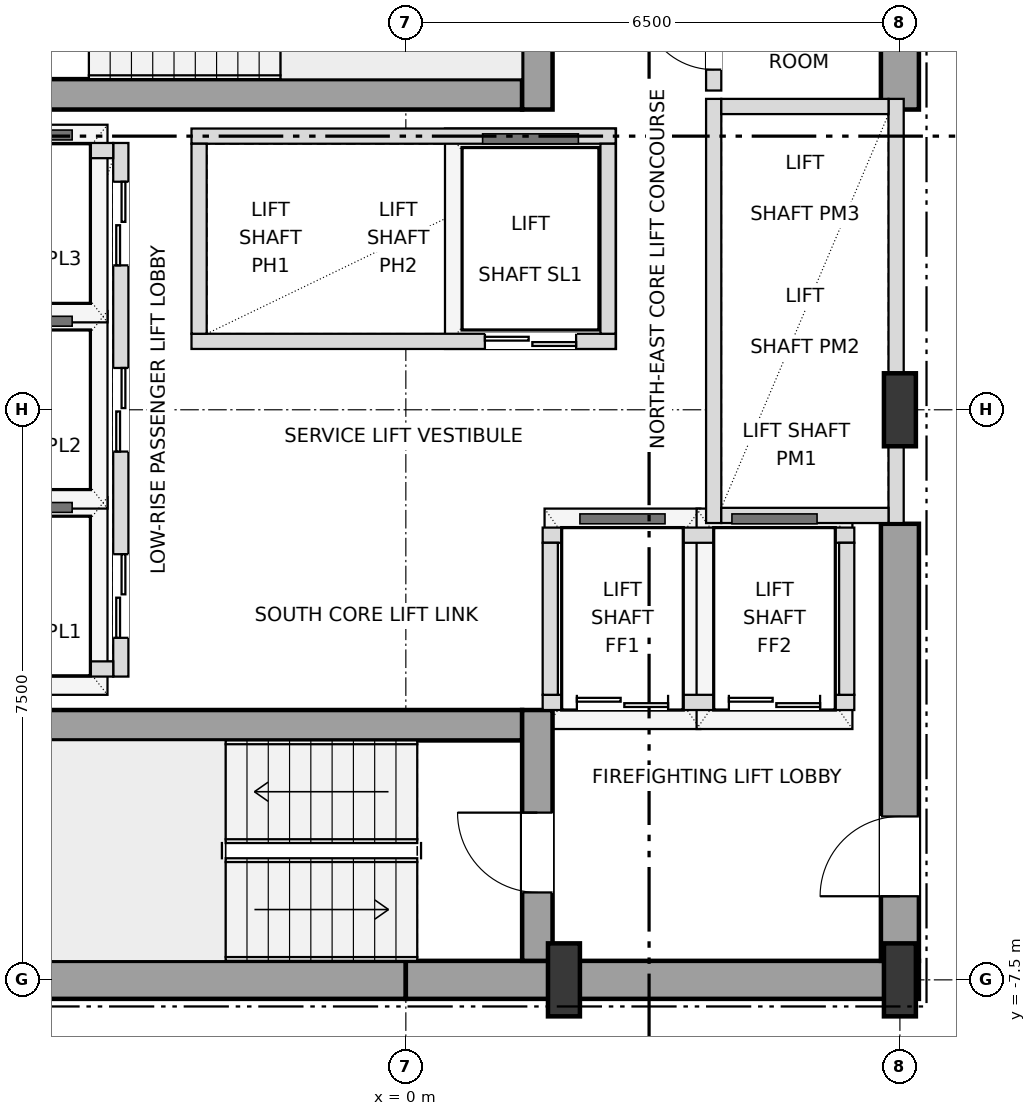
"""IFC4 building model, lengths in metres.
Left out: names, types, materials, properties, quantities, classifications, styles, units other than length and angle.
Written with IfcOpenShell. Run it as: python <this file> out.ifc"""

import sys

from ifc_helpers import new_model, si_unit, direction, frame, frame_2d, origin, origin_2d, place, context, subcontext, project, spatial, rectangle, i_section, extrude, element, fill, save


model = new_model("IFC4")
c1 = context("Model", 3, precision=1e-05, world=origin(), true_north=direction((0.0, 1.0)))
c2 = subcontext(c1, "Body", "Model", "MODEL_VIEW")
j1 = project(units=[si_unit("LENGTHUNIT", "METRE"), si_unit("PLANEANGLEUNIT", "RADIAN")], contexts=[c1])
p1 = place(None, origin())
s1 = spatial("IfcSite", under=j1, at=p1, CompositionType="ELEMENT")
p2 = place(p1, origin())
s2 = spatial("IfcBuilding", under=s1, at=p2, CompositionType="ELEMENT")
p3 = place(p2, frame((0.0, 0.0, 39.6)))
s3 = spatial("IfcBuildingStorey", under=s2, at=p3, CompositionType="ELEMENT", Elevation=39.6)
for number, where, z_axis, x_axis in (
    (1, (2.08, -7.5, 0.0), (0.0, 0.0, 1.0), (1.0, 0.0, 0.0)),
    (2, (6.5, -7.5, 0.0), (0.0, 0.0, 1.0), (1.0, 0.0, 0.0)),
    (3, (6.5, 0.0, 0.0), (0.0, 0.0, 1.0), (1.0, 0.0, 0.0)),
):
    element("IfcColumn", number, at=place(p3, frame(where, z_axis=z_axis, x_axis=x_axis)), inside=s3, PredefinedType="COLUMN", context=c2, shape_type="SweptSolid", body=[
        extrude(i_section(OverallWidth=0.42, OverallDepth=0.96, WebThickness=0.022, FlangeThickness=0.034, at=origin_2d()), origin(), (0.0, 0.0, 1.0), 3.6),
    ])
for number, where, z_axis, x_axis in (
    (4, (-6.75, -7.5, 0.0), (0.0, 0.0, 1.0), (1.0, 0.0, 0.0)),
    (5, (0.0, -7.5, 0.0), (0.0, 0.0, 1.0), (1.0, 0.0, 0.0)),
):
    element("IfcWall", number, at=place(p3, frame(where, z_axis=z_axis, x_axis=x_axis)), inside=s3, PredefinedType="SHEAR", context=c2, shape_type="SweptSolid", body=[
        extrude(rectangle(XDim=6.75, YDim=0.5, at=frame_2d((3.375, 0.0))), origin(), (0.0, 0.0, 1.0), 3.38),
    ])
p4 = place(p3, frame((6.5, -7.25, 0.0), z_axis=(0.0, 0.0, 1.0), x_axis=(0.0, 1.0, 0.0)))
e6 = element("IfcWall", 6, at=p4, inside=s3, PredefinedType="SHEAR", context=c2, shape_type="SweptSolid", body=[
    extrude(rectangle(XDim=5.75, YDim=0.5, at=frame_2d((2.875, 0.0))), origin(), (0.0, 0.0, 1.0), 3.38),
])
p5 = place(p4, frame((0.85, 0.0, 0.0)))
e7 = element("IfcOpeningElement", 7, at=p5, cuts=e6, PredefinedType="OPENING", context=c2, shape_type="SweptSolid", body=[
    extrude(rectangle(XDim=1.05, YDim=2.15, at=frame_2d((0.525, 1.075))), frame((0.0, 0.26, 0.0), z_axis=(0.0, -1.0, 0.0), x_axis=(1.0, 0.0, 0.0)), (0.0, 0.0, 1.0), 0.52),
])
p6 = place(p3, frame((6.5, 3.95, 0.0), z_axis=(0.0, 0.0, 1.0), x_axis=(0.0, 1.0, 0.0)))
e8 = element("IfcWall", 8, at=p6, inside=s3, PredefinedType="SHEAR", context=c2, shape_type="SweptSolid", body=[
    extrude(rectangle(XDim=3.3, YDim=0.5, at=frame_2d((1.65, 0.0))), origin(), (0.0, 0.0, 1.0), 3.38),
])
p7 = place(p3, frame((-6.25, -4.15, 0.0), z_axis=(0.0, 0.0, 1.0), x_axis=(1.0, 0.0, 0.0)))
e9 = element("IfcWall", 9, at=p7, inside=s3, PredefinedType="SHEAR", context=c2, shape_type="SweptSolid", body=[
    extrude(rectangle(XDim=7.78, YDim=0.4, at=frame_2d((3.89, 0.0))), origin(), (0.0, 0.0, 1.0), 3.38),
])
p8 = place(p3, frame((1.73, -7.25, 0.0), z_axis=(0.0, 0.0, 1.0), x_axis=(0.0, 1.0, 0.0)))
e10 = element("IfcWall", 10, at=p8, inside=s3, PredefinedType="SHEAR", context=c2, shape_type="SweptSolid", body=[
    extrude(rectangle(XDim=3.3, YDim=0.4, at=frame_2d((1.65, 0.0))), origin(), (0.0, 0.0, 1.0), 3.38),
])
p9 = place(p8, frame((0.9, 0.0, 0.0)))
e11 = element("IfcOpeningElement", 11, at=p9, cuts=e10, PredefinedType="OPENING", context=c2, shape_type="SweptSolid", body=[
    extrude(rectangle(XDim=1.05, YDim=2.15, at=frame_2d((0.525, 1.075))), frame((0.0, 0.21, 0.0), z_axis=(0.0, -1.0, 0.0), x_axis=(1.0, 0.0, 0.0)), (0.0, 0.0, 1.0), 0.42),
])
p10 = place(p3, frame((-5.55, 4.15, 0.0), z_axis=(0.0, 0.0, 1.0), x_axis=(1.0, 0.0, 0.0)))
e12 = element("IfcWall", 12, at=p10, inside=s3, PredefinedType="SHEAR", context=c2, shape_type="SweptSolid", body=[
    extrude(rectangle(XDim=7.08, YDim=0.4, at=frame_2d((3.54, 0.0))), origin(), (0.0, 0.0, 1.0), 3.38),
])
p11 = place(p3, frame((1.73, 3.95, 0.0), z_axis=(0.0, 0.0, 1.0), x_axis=(0.0, 1.0, 0.0)))
e13 = element("IfcWall", 13, at=p11, inside=s3, PredefinedType="SHEAR", context=c2, shape_type="SweptSolid", body=[
    extrude(rectangle(XDim=3.3, YDim=0.4, at=frame_2d((1.65, 0.0))), origin(), (0.0, 0.0, 1.0), 3.38),
])
p12 = place(p3, frame((-3.75, -3.51, 0.0), z_axis=(0.0, 0.0, 1.0), x_axis=(0.0, 1.0, 0.0)))
e14 = element("IfcWall", 14, at=p12, inside=s3, PredefinedType="SOLIDWALL", context=c2, shape_type="SweptSolid", body=[
    extrude(rectangle(XDim=7.02, YDim=0.2, at=frame_2d((3.51, 0.0))), origin(), (0.0, 0.0, 1.0), 3.38),
])
p13 = place(p12, frame((0.51, 0.0, 0.0)))
e15 = element("IfcOpeningElement", 15, at=p13, cuts=e14, PredefinedType="OPENING", context=c2, shape_type="SweptSolid", body=[
    extrude(rectangle(XDim=1.1, YDim=2.15, at=frame_2d((0.55, 1.075))), frame((0.0, 0.11, 0.0), z_axis=(0.0, -1.0, 0.0), x_axis=(1.0, 0.0, 0.0)), (0.0, 0.0, 1.0), 0.22),
])
p14 = place(p12, frame((2.96, 0.0, 0.0)))
e16 = element("IfcOpeningElement", 16, at=p14, cuts=e14, PredefinedType="OPENING", context=c2, shape_type="SweptSolid", body=[
    extrude(rectangle(XDim=1.1, YDim=2.15, at=frame_2d((0.55, 1.075))), frame((0.0, 0.11, 0.0), z_axis=(0.0, -1.0, 0.0), x_axis=(1.0, 0.0, 0.0)), (0.0, 0.0, 1.0), 0.22),
])
p15 = place(p12, frame((5.41, 0.0, 0.0)))
e17 = element("IfcOpeningElement", 17, at=p15, cuts=e14, PredefinedType="OPENING", context=c2, shape_type="SweptSolid", body=[
    extrude(rectangle(XDim=1.1, YDim=2.15, at=frame_2d((0.55, 1.075))), frame((0.0, 0.11, 0.0), z_axis=(0.0, -1.0, 0.0), x_axis=(1.0, 0.0, 0.0)), (0.0, 0.0, 1.0), 0.22),
])
for number, where, z_axis, x_axis in (
    (18, (-6.05, -3.41, 0.0), (0.0, 0.0, 1.0), (1.0, 0.0, 0.0)),
    (19, (-6.05, 3.41, 0.0), (0.0, 0.0, 1.0), (1.0, 0.0, 0.0)),
):
    element("IfcWall", number, at=place(p3, frame(where, z_axis=z_axis, x_axis=x_axis)), inside=s3, PredefinedType="SOLIDWALL", context=c2, shape_type="SweptSolid", body=[
        extrude(rectangle(XDim=2.2, YDim=0.2, at=frame_2d((1.1, 0.0))), origin(), (0.0, 0.0, 1.0), 3.38),
    ])
p16 = place(p3, frame((4.05, -1.49, 0.0), z_axis=(0.0, 0.0, 1.0), x_axis=(0.0, 1.0, 0.0)))
e20 = element("IfcWall", 20, at=p16, inside=s3, PredefinedType="SOLIDWALL", context=c2, shape_type="SweptSolid", body=[
    extrude(rectangle(XDim=5.58, YDim=0.2, at=frame_2d((2.79, 0.0))), origin(), (0.0, 0.0, 1.0), 3.38),
])
p17 = place(p3, frame((6.45, -1.49, 0.0), z_axis=(0.0, 0.0, 1.0), x_axis=(0.0, 1.0, 0.0)))
e21 = element("IfcWall", 21, at=p17, inside=s3, PredefinedType="SOLIDWALL", context=c2, shape_type="SweptSolid", body=[
    extrude(rectangle(XDim=5.58, YDim=0.2, at=frame_2d((2.79, 0.0))), origin(), (0.0, 0.0, 1.0), 2.816),
])
for number, where, z_axis, x_axis in (
    (22, (4.15, -1.39, 0.0), (0.0, 0.0, 1.0), (1.0, 0.0, 0.0)),
    (23, (4.15, 3.99, 0.0), (0.0, 0.0, 1.0), (1.0, 0.0, 0.0)),
):
    element("IfcWall", number, at=place(p3, frame(where, z_axis=z_axis, x_axis=x_axis)), inside=s3, PredefinedType="SOLIDWALL", context=c2, shape_type="SweptSolid", body=[
        extrude(rectangle(XDim=2.2, YDim=0.2, at=frame_2d((1.1, 0.0))), origin(), (0.0, 0.0, 1.0), 3.38),
    ])
p18 = place(p3, frame((-2.82, 0.9, 0.0), z_axis=(0.0, 0.0, 1.0), x_axis=(1.0, 0.0, 0.0)))
e24 = element("IfcWall", 24, at=p18, inside=s3, PredefinedType="SOLIDWALL", context=c2, shape_type="SweptSolid", body=[
    extrude(rectangle(XDim=5.58, YDim=0.2, at=frame_2d((2.79, 0.0))), origin(), (0.0, 0.0, 1.0), 3.38),
])
p19 = place(p18, frame((3.86, 0.0, 0.0)))
e25 = element("IfcOpeningElement", 25, at=p19, cuts=e24, PredefinedType="OPENING", context=c2, shape_type="SweptSolid", body=[
    extrude(rectangle(XDim=1.2, YDim=2.2, at=frame_2d((0.6, 1.1))), frame((0.0, 0.11, 0.0), z_axis=(0.0, -1.0, 0.0), x_axis=(1.0, 0.0, 0.0)), (0.0, 0.0, 1.0), 0.22),
])
p20 = place(p3, frame((-2.82, 3.6, 0.0), z_axis=(0.0, 0.0, 1.0), x_axis=(1.0, 0.0, 0.0)))
e26 = element("IfcWall", 26, at=p20, inside=s3, PredefinedType="SOLIDWALL", context=c2, shape_type="SweptSolid", body=[
    extrude(rectangle(XDim=5.58, YDim=0.2, at=frame_2d((2.79, 0.0))), origin(), (0.0, 0.0, 1.0), 3.38),
])
for number, where, z_axis, x_axis in (
    (27, (-2.72, 1.0, 0.0), (0.0, 0.0, 1.0), (0.0, 1.0, 0.0)),
    (28, (2.66, 1.0, 0.0), (0.0, 0.0, 1.0), (0.0, 1.0, 0.0)),
):
    element("IfcWall", number, at=place(p3, frame(where, z_axis=z_axis, x_axis=x_axis)), inside=s3, PredefinedType="SOLIDWALL", context=c2, shape_type="SweptSolid", body=[
        extrude(rectangle(XDim=2.5, YDim=0.2, at=frame_2d((1.25, 0.0))), origin(), (0.0, 0.0, 1.0), 3.38),
    ])
p21 = place(p3, frame((1.8, -3.85, 0.0), z_axis=(0.0, 0.0, 1.0), x_axis=(1.0, 0.0, 0.0)))
e29 = element("IfcWall", 29, at=p21, inside=s3, PredefinedType="SOLIDWALL", context=c2, shape_type="SweptSolid", body=[
    extrude(rectangle(XDim=4.1, YDim=0.2, at=frame_2d((2.05, 0.0))), origin(), (0.0, 0.0, 1.0), 3.38),
])
p22 = place(p21, frame((0.45, 0.0, 0.0)))
e30 = element("IfcOpeningElement", 30, at=p22, cuts=e29, PredefinedType="OPENING", context=c2, shape_type="SweptSolid", body=[
    extrude(rectangle(XDim=1.2, YDim=2.2, at=frame_2d((0.6, 1.1))), frame((0.0, 0.11, 0.0), z_axis=(0.0, -1.0, 0.0), x_axis=(1.0, 0.0, 0.0)), (0.0, 0.0, 1.0), 0.22),
])
p23 = place(p21, frame((2.45, 0.0, 0.0)))
e31 = element("IfcOpeningElement", 31, at=p23, cuts=e29, PredefinedType="OPENING", context=c2, shape_type="SweptSolid", body=[
    extrude(rectangle(XDim=1.2, YDim=2.2, at=frame_2d((0.6, 1.1))), frame((0.0, 0.11, 0.0), z_axis=(0.0, -1.0, 0.0), x_axis=(1.0, 0.0, 0.0)), (0.0, 0.0, 1.0), 0.22),
])
p24 = place(p3, frame((1.8, -1.65, 0.0), z_axis=(0.0, 0.0, 1.0), x_axis=(1.0, 0.0, 0.0)))
e32 = element("IfcWall", 32, at=p24, inside=s3, PredefinedType="SOLIDWALL", context=c2, shape_type="SweptSolid", body=[
    extrude(rectangle(XDim=4.1, YDim=0.2, at=frame_2d((2.05, 0.0))), origin(), (0.0, 0.0, 1.0), 3.38),
])
for number, where, z_axis, x_axis in (
    (33, (1.9, -3.75, 0.0), (0.0, 0.0, 1.0), (0.0, 1.0, 0.0)),
    (34, (5.8, -3.75, 0.0), (0.0, 0.0, 1.0), (0.0, 1.0, 0.0)),
):
    element("IfcWall", number, at=place(p3, frame(where, z_axis=z_axis, x_axis=x_axis)), inside=s3, PredefinedType="SOLIDWALL", context=c2, shape_type="SweptSolid", body=[
        extrude(rectangle(XDim=2.0, YDim=0.2, at=frame_2d((1.0, 0.0))), origin(), (0.0, 0.0, 1.0), 3.38),
    ])
p25 = place(p3, frame((4.05, 4.2, 0.0), z_axis=(0.0, 0.0, 1.0), x_axis=(0.0, 1.0, 0.0)))
e35 = element("IfcWall", 35, at=p25, inside=s3, PredefinedType="SOLIDWALL", context=c2, shape_type="SweptSolid", body=[
    extrude(rectangle(XDim=3.05, YDim=0.2, at=frame_2d((1.525, 0.0))), origin(), (0.0, 0.0, 1.0), 3.38),
])
p26 = place(p25, frame((0.275, 0.0, 0.0)))
e36 = element("IfcOpeningElement", 36, at=p26, cuts=e35, PredefinedType="OPENING", context=c2, shape_type="SweptSolid", body=[
    extrude(rectangle(XDim=0.95, YDim=2.15, at=frame_2d((0.475, 1.075))), frame((0.0, 0.11, 0.0), z_axis=(0.0, -1.0, 0.0), x_axis=(1.0, 0.0, 0.0)), (0.0, 0.0, 1.0), 0.22),
])
p27 = place(p25, frame((1.775, 0.0, 0.0)))
e37 = element("IfcOpeningElement", 37, at=p27, cuts=e35, PredefinedType="OPENING", context=c2, shape_type="SweptSolid", body=[
    extrude(rectangle(XDim=0.95, YDim=2.15, at=frame_2d((0.475, 1.075))), frame((0.0, 0.11, 0.0), z_axis=(0.0, -1.0, 0.0), x_axis=(1.0, 0.0, 0.0)), (0.0, 0.0, 1.0), 0.22),
])
p28 = place(p5, origin())
e38 = element("IfcDoor", 38, at=p28, inside=s3, OperationType="SINGLE_SWING_LEFT", PredefinedType="DOOR", context=c2, shape_type="SweptSolid", body=[
    extrude(rectangle(XDim=1.05, YDim=2.15, at=frame_2d((0.525, 1.075))), frame((0.0, 0.025, 0.0), z_axis=(0.0, -1.0, 0.0), x_axis=(1.0, 0.0, 0.0)), (0.0, 0.0, 1.0), 0.05),
])
fill(e7, e38)
p29 = place(p9, origin())
e39 = element("IfcDoor", 39, at=p29, inside=s3, OperationType="SINGLE_SWING_RIGHT", PredefinedType="DOOR", context=c2, shape_type="SweptSolid", body=[
    extrude(rectangle(XDim=1.05, YDim=2.15, at=frame_2d((0.525, 1.075))), frame((0.0, 0.025, 0.0), z_axis=(0.0, -1.0, 0.0), x_axis=(1.0, 0.0, 0.0)), (0.0, 0.0, 1.0), 0.05),
])
fill(e11, e39)
p30 = place(p13, origin())
e40 = element("IfcDoor", 40, at=p30, inside=s3, OperationType="DOUBLE_DOOR_SLIDING", PredefinedType="DOOR", context=c2, shape_type="SweptSolid", body=[
    extrude(rectangle(XDim=1.1, YDim=2.15, at=frame_2d((0.55, 1.075))), frame((0.0, 0.025, 0.0), z_axis=(0.0, -1.0, 0.0), x_axis=(1.0, 0.0, 0.0)), (0.0, 0.0, 1.0), 0.05),
])
fill(e15, e40)
p31 = place(p14, origin())
e41 = element("IfcDoor", 41, at=p31, inside=s3, OperationType="DOUBLE_DOOR_SLIDING", PredefinedType="DOOR", context=c2, shape_type="SweptSolid", body=[
    extrude(rectangle(XDim=1.1, YDim=2.15, at=frame_2d((0.55, 1.075))), frame((0.0, 0.025, 0.0), z_axis=(0.0, -1.0, 0.0), x_axis=(1.0, 0.0, 0.0)), (0.0, 0.0, 1.0), 0.05),
])
fill(e16, e41)
p32 = place(p15, origin())
e42 = element("IfcDoor", 42, at=p32, inside=s3, OperationType="DOUBLE_DOOR_SLIDING", PredefinedType="DOOR", context=c2, shape_type="SweptSolid", body=[
    extrude(rectangle(XDim=1.1, YDim=2.15, at=frame_2d((0.55, 1.075))), frame((0.0, 0.025, 0.0), z_axis=(0.0, -1.0, 0.0), x_axis=(1.0, 0.0, 0.0)), (0.0, 0.0, 1.0), 0.05),
])
fill(e17, e42)
p33 = place(p19, origin())
e43 = element("IfcDoor", 43, at=p33, inside=s3, OperationType="DOUBLE_DOOR_SLIDING", PredefinedType="DOOR", context=c2, shape_type="SweptSolid", body=[
    extrude(rectangle(XDim=1.2, YDim=2.2, at=frame_2d((0.6, 1.1))), frame((0.0, 0.025, 0.0), z_axis=(0.0, -1.0, 0.0), x_axis=(1.0, 0.0, 0.0)), (0.0, 0.0, 1.0), 0.05),
])
fill(e25, e43)
p34 = place(p22, origin())
e44 = element("IfcDoor", 44, at=p34, inside=s3, OperationType="DOUBLE_DOOR_SLIDING", PredefinedType="DOOR", context=c2, shape_type="SweptSolid", body=[
    extrude(rectangle(XDim=1.2, YDim=2.2, at=frame_2d((0.6, 1.1))), frame((0.0, 0.025, 0.0), z_axis=(0.0, -1.0, 0.0), x_axis=(1.0, 0.0, 0.0)), (0.0, 0.0, 1.0), 0.05),
])
fill(e30, e44)
p35 = place(p23, origin())
e45 = element("IfcDoor", 45, at=p35, inside=s3, OperationType="DOUBLE_DOOR_SLIDING", PredefinedType="DOOR", context=c2, shape_type="SweptSolid", body=[
    extrude(rectangle(XDim=1.2, YDim=2.2, at=frame_2d((0.6, 1.1))), frame((0.0, 0.025, 0.0), z_axis=(0.0, -1.0, 0.0), x_axis=(1.0, 0.0, 0.0)), (0.0, 0.0, 1.0), 0.05),
])
fill(e31, e45)
p36 = place(p26, origin())
e46 = element("IfcDoor", 46, at=p36, inside=s3, OperationType="SINGLE_SWING_RIGHT", PredefinedType="DOOR", context=c2, shape_type="SweptSolid", body=[
    extrude(rectangle(XDim=0.95, YDim=2.15, at=frame_2d((0.475, 1.075))), frame((0.0, 0.025, 0.0), z_axis=(0.0, -1.0, 0.0), x_axis=(1.0, 0.0, 0.0)), (0.0, 0.0, 1.0), 0.05),
])
fill(e36, e46)
save(model, sys.argv[1])
